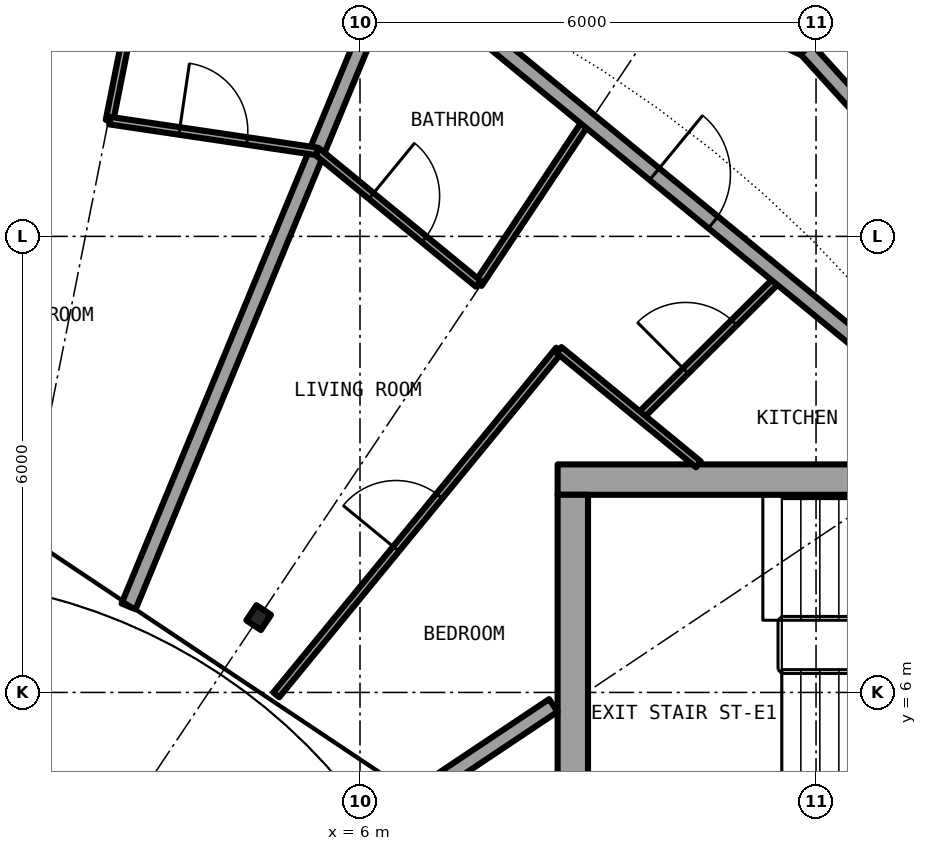
"""IFC4 building model, lengths in metres.
Left out: names, types, materials, properties, quantities, classifications, styles, units other than length and angle.
Written with IfcOpenShell. Run it as: python <this file> out.ifc"""

import sys

from ifc_helpers import new_model, si_unit, direction, frame, frame_2d, origin, origin_2d, place, context, subcontext, project, spatial, rectangle, i_section, extrude, element, fill, save


model = new_model("IFC4")
c1 = context("Model", 3, precision=1e-05, world=origin(), true_north=direction((0.0, 1.0)))
c2 = subcontext(c1, "Body", "Model", "MODEL_VIEW")
j1 = project(units=[si_unit("LENGTHUNIT", "METRE"), si_unit("PLANEANGLEUNIT", "RADIAN")], contexts=[c1])
p1 = place(None, origin())
s1 = spatial("IfcSite", under=j1, at=p1, CompositionType="ELEMENT")
p2 = place(p1, origin())
s2 = spatial("IfcBuilding", under=s1, at=p2, CompositionType="ELEMENT")
p3 = place(p2, frame((0.0, 0.0, 249.3)))
s3 = spatial("IfcBuildingStorey", under=s2, at=p3, CompositionType="ELEMENT", Elevation=249.3)
p4 = place(p3, frame((4.667, 6.984, 0.0), z_axis=(0.0, 0.0, 1.0), x_axis=(0.55557023302, 0.831469612303, 0.0)))
e1 = element("IfcColumn", 1, at=p4, inside=s3, PredefinedType="COLUMN", context=c2, shape_type="SweptSolid", body=[
    extrude(i_section(OverallWidth=0.24, OverallDepth=0.23, WebThickness=0.008, FlangeThickness=0.012, FilletRadius=0.021, at=origin_2d()), origin(), (0.0, 0.0, 1.0), 3.05),
])
p5 = place(p3, frame((21.1, 8.8, 0.0), z_axis=(0.0, 0.0, 1.0), x_axis=(-1.0, 0.0, 0.0)))
e2 = element("IfcWall", 2, at=p5, inside=s3, PredefinedType="SHEAR", context=c2, shape_type="SweptSolid", body=[
    extrude(rectangle(XDim=12.5, YDim=0.4, at=frame_2d((6.25, 0.0))), origin(), (0.0, 0.0, 1.0), 3.05),
])
p6 = place(p5, frame((0.475, 0.0, 0.0)))
e3 = element("IfcOpeningElement", 3, at=p6, cuts=e2, PredefinedType="OPENING", context=c2, shape_type="SweptSolid", body=[
    extrude(rectangle(XDim=1.2, YDim=2.3, at=frame_2d((0.6, 1.15))), frame((0.0, 0.21, 0.0), z_axis=(0.0, -1.0, 0.0), x_axis=(1.0, 0.0, 0.0)), (0.0, 0.0, 1.0), 0.42),
])
p7 = place(p3, frame((8.8, -8.6, 0.0), z_axis=(0.0, 0.0, 1.0), x_axis=(0.0, 1.0, 0.0)))
e4 = element("IfcWall", 4, at=p7, inside=s3, PredefinedType="SHEAR", context=c2, shape_type="SweptSolid", body=[
    extrude(rectangle(XDim=17.2, YDim=0.4, at=frame_2d((8.6, 0.0))), origin(), (0.0, 0.0, 1.0), 3.05),
])
p8 = place(p7, frame((7.4, 0.0, 0.1)))
e5 = element("IfcOpeningElement", 5, at=p8, cuts=e4, PredefinedType="OPENING", context=c2, shape_type="SweptSolid", body=[
    extrude(rectangle(XDim=2.4, YDim=2.2, at=frame_2d((1.2, 1.1))), frame((0.0, 0.21, 0.0), z_axis=(0.0, -1.0, 0.0), x_axis=(1.0, 0.0, 0.0)), (0.0, 0.0, 1.0), 0.42),
])
p9 = place(p3, frame((2.704, 13.524, 0.0), z_axis=(0.0, 0.0, 1.0), x_axis=(0.195937128464, 0.980616460034, 0.0)))
e6 = element("IfcWall", 6, at=p9, inside=s3, PredefinedType="PARTITIONING", context=c2, shape_type="SweptSolid", body=[
    extrude(rectangle(XDim=2.623, YDim=0.1, at=frame_2d((1.312, 0.0))), origin(), (0.0, 0.0, 1.0), 2.7),
])
p10 = place(p3, frame((2.955, 7.132, 0.0), z_axis=(0.0, 0.0, 1.0), x_axis=(0.382556139466, 0.923932248683, 0.0)))
e7 = element("IfcWall", 7, at=p10, inside=s3, PredefinedType="PARTITIONING", context=c2, shape_type="SweptSolid", body=[
    extrude(rectangle(XDim=9.18, YDim=0.2, at=frame_2d((4.59, 0.0))), origin(), (0.0, 0.0, 1.0), 2.7),
])
p11 = place(p3, frame((4.898, 5.968, 0.0), z_axis=(0.0, 0.0, 1.0), x_axis=(0.634358693064, 0.773038840249, 0.0)))
e8 = element("IfcWall", 8, at=p11, inside=s3, PredefinedType="PARTITIONING", context=c2, shape_type="SweptSolid", body=[
    extrude(rectangle(XDim=5.868, YDim=0.1, at=frame_2d((2.934, 0.0))), origin(), (0.0, 0.0, 1.0), 2.7),
])
p12 = place(p11, frame((2.484, 0.0, 0.0)))
e9 = element("IfcOpeningElement", 9, at=p12, cuts=e8, PredefinedType="OPENING", context=c2, shape_type="SweptSolid", body=[
    extrude(rectangle(XDim=0.9, YDim=2.3, at=frame_2d((0.45, 1.15))), frame((0.0, 0.06, 0.0), z_axis=(0.0, -1.0, 0.0), x_axis=(1.0, 0.0, 0.0)), (0.0, 0.0, 1.0), 0.12),
])
p13 = place(p3, frame((7.558, 11.376, 0.0), z_axis=(0.0, 0.0, 1.0), x_axis=(0.553615197403, 0.83277260594, 0.0)))
e10 = element("IfcWall", 10, at=p13, inside=s3, PredefinedType="PARTITIONING", context=c2, shape_type="SweptSolid", body=[
    extrude(rectangle(XDim=2.597, YDim=0.1, at=frame_2d((1.299, 0.0))), origin(), (0.0, 0.0, 1.0), 2.7),
])
p14 = place(p3, frame((9.683, 9.632, 0.0), z_axis=(0.0, 0.0, 1.0), x_axis=(0.708796844581, 0.705412668665, 0.0)))
e11 = element("IfcWall", 11, at=p14, inside=s3, PredefinedType="PARTITIONING", context=c2, shape_type="SweptSolid", body=[
    extrude(rectangle(XDim=2.597, YDim=0.1, at=frame_2d((1.299, 0.0))), origin(), (0.0, 0.0, 1.0), 2.7),
])
p15 = place(p14, frame((0.849, 0.0, 0.0)))
e12 = element("IfcOpeningElement", 12, at=p15, cuts=e11, PredefinedType="OPENING", context=c2, shape_type="SweptSolid", body=[
    extrude(rectangle(XDim=0.9, YDim=2.3, at=frame_2d((0.45, 1.15))), frame((0.0, 0.06, 0.0), z_axis=(0.0, -1.0, 0.0), x_axis=(1.0, 0.0, 0.0)), (0.0, 0.0, 1.0), 0.12),
])
p16 = place(p3, frame((11.87, 14.464, 0.0), z_axis=(0.0, 0.0, 1.0), x_axis=(0.634207563301, 0.773162833206, 0.0)))
e13 = element("IfcWall", 13, at=p16, inside=s3, PredefinedType="PARTITIONING", context=c2, shape_type="SweptSolid", body=[
    extrude(rectangle(XDim=4.289, YDim=0.15, at=frame_2d((2.145, 0.0))), origin(), (0.0, 0.0, 1.0), 2.7),
])
p17 = place(p3, frame((6.513, 4.472, 0.0), z_axis=(0.0, 0.0, 1.0), x_axis=(0.831450132577, 0.555599385382, 0.0)))
e14 = element("IfcWall", 14, at=p17, inside=s3, PredefinedType="PARTITIONING", context=c2, shape_type="SweptSolid", body=[
    extrude(rectangle(XDim=2.443, YDim=0.2, at=frame_2d((1.221, 0.0))), origin(), (0.0, 0.0, 1.0), 2.7),
])
p18 = place(p3, frame((5.431, 13.12, 0.0), z_axis=(0.0, 0.0, 1.0), x_axis=(0.773149312811, -0.634224045665, 0.0)))
e15 = element("IfcWall", 15, at=p18, inside=s3, PredefinedType="PARTITIONING", context=c2, shape_type="SweptSolid", body=[
    extrude(rectangle(XDim=2.749, YDim=0.1, at=frame_2d((1.374, 0.0))), origin(), (0.0, 0.0, 1.0), 2.7),
])
p19 = place(p18, frame((0.927, 0.0, 0.0)))
e16 = element("IfcOpeningElement", 16, at=p19, cuts=e15, PredefinedType="OPENING", context=c2, shape_type="SweptSolid", body=[
    extrude(rectangle(XDim=0.9, YDim=2.3, at=frame_2d((0.45, 1.15))), frame((0.0, 0.06, 0.0), z_axis=(0.0, -1.0, 0.0), x_axis=(1.0, 0.0, 0.0)), (0.0, 0.0, 1.0), 0.12),
])
p20 = place(p3, frame((8.619, 10.505, 0.0), z_axis=(0.0, 0.0, 1.0), x_axis=(0.773094085324, -0.634291364624, 0.0)))
e17 = element("IfcWall", 17, at=p20, inside=s3, PredefinedType="PARTITIONING", context=c2, shape_type="SweptSolid", body=[
    extrude(rectangle(XDim=2.371, YDim=0.1, at=frame_2d((1.186, 0.0))), origin(), (0.0, 0.0, 1.0), 2.7),
])
p21 = place(p3, frame((2.707, 13.523, 0.0), z_axis=(0.0, 0.0, 1.0), x_axis=(0.98916494308, -0.146808430897, 0.0)))
e18 = element("IfcWall", 18, at=p21, inside=s3, PredefinedType="PARTITIONING", context=c2, shape_type="SweptSolid", body=[
    extrude(rectangle(XDim=2.759, YDim=0.1, at=frame_2d((1.379, 0.0))), origin(), (0.0, 0.0, 1.0), 2.7),
])
p22 = place(p21, frame((0.927, 0.0, 0.0)))
e19 = element("IfcOpeningElement", 19, at=p22, cuts=e18, PredefinedType="OPENING", context=c2, shape_type="SweptSolid", body=[
    extrude(rectangle(XDim=0.9, YDim=2.3, at=frame_2d((0.45, 1.15))), frame((0.0, 0.06, 0.0), z_axis=(0.0, -1.0, 0.0), x_axis=(1.0, 0.0, 0.0)), (0.0, 0.0, 1.0), 0.12),
])
p23 = place(p3, frame((6.47, 15.613, 0.0), z_axis=(0.0, 0.0, 1.0), x_axis=(0.77292501819, -0.634497372931, 0.0)))
e20 = element("IfcWall", 20, at=p23, inside=s3, PredefinedType="PARTITIONING", context=c2, shape_type="SweptSolid", body=[
    extrude(rectangle(XDim=9.81, YDim=0.2, at=frame_2d((4.905, 0.0))), origin(), (0.0, 0.0, 1.0), 2.7),
])
p24 = place(p23, frame((4.404, 0.0, 0.0)))
e21 = element("IfcOpeningElement", 21, at=p24, cuts=e20, PredefinedType="OPENING", context=c2, shape_type="SweptSolid", body=[
    extrude(rectangle(XDim=1.0, YDim=2.3, at=frame_2d((0.5, 1.15))), frame((0.0, 0.11, 0.0), z_axis=(0.0, -1.0, 0.0), x_axis=(1.0, 0.0, 0.0)), (0.0, 0.0, 1.0), 0.22),
])
p25 = place(p3, frame((3.65, 18.351, 0.0), z_axis=(0.0, 0.0, 1.0), x_axis=(0.904027935406, -0.427473381634, 0.0)))
e22 = element("IfcWall", 22, at=p25, inside=s3, PredefinedType="PARTITIONING", context=c2, shape_type="SweptSolid", body=[
    extrude(rectangle(XDim=9.093, YDim=0.2, at=frame_2d((4.546, 0.0))), origin(), (0.0, 0.0, 1.0), 2.7),
])
p26 = place(p25, frame((4.046, 0.0, 0.0)))
e23 = element("IfcOpeningElement", 23, at=p26, cuts=e22, PredefinedType="OPENING", context=c2, shape_type="SweptSolid", body=[
    extrude(rectangle(XDim=1.0, YDim=2.3, at=frame_2d((0.5, 1.15))), frame((0.0, 0.11, 0.0), z_axis=(0.0, -1.0, 0.0), x_axis=(1.0, 0.0, 0.0)), (0.0, 0.0, 1.0), 0.22),
])
p27 = place(p3, frame((11.87, 14.464, 0.0), z_axis=(0.0, 0.0, 1.0), x_axis=(0.671434738137, -0.741063689856, 0.0)))
e24 = element("IfcWall", 24, at=p27, inside=s3, PredefinedType="PARTITIONING", context=c2, shape_type="SweptSolid", body=[
    extrude(rectangle(XDim=5.491, YDim=0.2, at=frame_2d((2.746, 0.0))), origin(), (0.0, 0.0, 1.0), 2.7),
])
p28 = place(p27, frame((2.245, 0.0, 0.0)))
e25 = element("IfcOpeningElement", 25, at=p28, cuts=e24, PredefinedType="OPENING", context=c2, shape_type="SweptSolid", body=[
    extrude(rectangle(XDim=1.0, YDim=2.3, at=frame_2d((0.5, 1.15))), frame((0.0, 0.11, 0.0), z_axis=(0.0, -1.0, 0.0), x_axis=(1.0, 0.0, 0.0)), (0.0, 0.0, 1.0), 0.22),
])
p29 = place(p24, origin())
e26 = element("IfcDoor", 26, at=p29, inside=s3, OperationType="SINGLE_SWING_LEFT", PredefinedType="DOOR", context=c2, shape_type="SweptSolid", body=[
    extrude(rectangle(XDim=1.0, YDim=2.3, at=frame_2d((0.5, 1.15))), frame((0.0, 0.025, 0.0), z_axis=(0.0, -1.0, 0.0), x_axis=(1.0, 0.0, 0.0)), (0.0, 0.0, 1.0), 0.05),
])
fill(e21, e26)
p30 = place(p19, origin())
e27 = element("IfcDoor", 27, at=p30, inside=s3, OperationType="SINGLE_SWING_RIGHT", PredefinedType="DOOR", context=c2, shape_type="SweptSolid", body=[
    extrude(rectangle(XDim=0.9, YDim=2.3, at=frame_2d((0.45, 1.15))), frame((0.0, 0.025, 0.0), z_axis=(0.0, -1.0, 0.0), x_axis=(1.0, 0.0, 0.0)), (0.0, 0.0, 1.0), 0.05),
])
fill(e16, e27)
p31 = place(p15, origin())
e28 = element("IfcDoor", 28, at=p31, inside=s3, OperationType="SINGLE_SWING_LEFT", PredefinedType="DOOR", context=c2, shape_type="SweptSolid", body=[
    extrude(rectangle(XDim=0.9, YDim=2.3, at=frame_2d((0.45, 1.15))), frame((0.0, 0.025, 0.0), z_axis=(0.0, -1.0, 0.0), x_axis=(1.0, 0.0, 0.0)), (0.0, 0.0, 1.0), 0.05),
])
fill(e12, e28)
p32 = place(p12, origin())
e29 = element("IfcDoor", 29, at=p32, inside=s3, OperationType="SINGLE_SWING_RIGHT", PredefinedType="DOOR", context=c2, shape_type="SweptSolid", body=[
    extrude(rectangle(XDim=0.9, YDim=2.3, at=frame_2d((0.45, 1.15))), frame((0.0, 0.025, 0.0), z_axis=(0.0, -1.0, 0.0), x_axis=(1.0, 0.0, 0.0)), (0.0, 0.0, 1.0), 0.05),
])
fill(e9, e29)
p33 = place(p22, origin())
e30 = element("IfcDoor", 30, at=p33, inside=s3, OperationType="SINGLE_SWING_LEFT", PredefinedType="DOOR", context=c2, shape_type="SweptSolid", body=[
    extrude(rectangle(XDim=0.9, YDim=2.3, at=frame_2d((0.45, 1.15))), frame((0.0, 0.025, 0.0), z_axis=(0.0, -1.0, 0.0), x_axis=(1.0, 0.0, 0.0)), (0.0, 0.0, 1.0), 0.05),
])
fill(e19, e30)
save(model, sys.argv[1])
